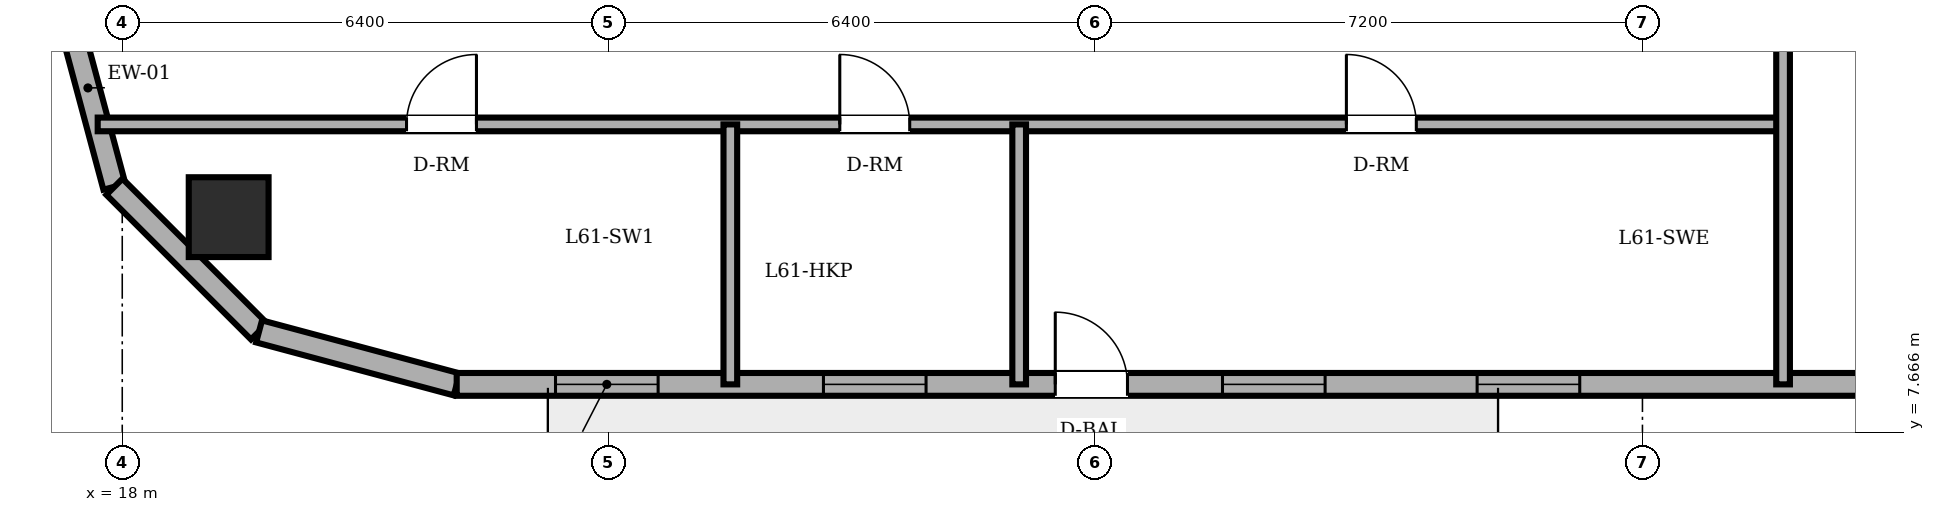
"""IFC4 building model, lengths in metres.
Left out: names, types, materials, properties, quantities, classifications, styles, units other than length and angle.
Written with IfcOpenShell. Run it as: python <this file> out.ifc"""

import sys

from ifc_helpers import new_model, si_unit, direction, frame, frame_2d, origin, origin_2d, place, context, subcontext, project, spatial, rectangle, circle, extrude, element, fill, save


model = new_model("IFC4")
c1 = context("Model", 3, precision=1e-05, world=origin(), true_north=direction((0.0, 1.0)))
c2 = subcontext(c1, "Body", "Model", "MODEL_VIEW")
j1 = project(units=[si_unit("LENGTHUNIT", "METRE"), si_unit("PLANEANGLEUNIT", "RADIAN")], contexts=[c1])
p1 = place(None, origin())
s1 = spatial("IfcSite", under=j1, at=p1, CompositionType="ELEMENT")
p2 = place(p1, origin())
s2 = spatial("IfcBuilding", under=s1, at=p2, CompositionType="ELEMENT")
p3 = place(p2, frame((0.0, 0.0, 233.7)))
s3 = spatial("IfcBuildingStorey", under=s2, at=p3, CompositionType="ELEMENT", Elevation=233.7)
p4 = place(p3, frame((19.4, 10.5, 0.0), z_axis=(0.0, 0.0, 1.0), x_axis=(1.0, 0.0, 0.0)))
e1 = element("IfcColumn", 1, at=p4, inside=s3, PredefinedType="COLUMN", context=c2, shape_type="SweptSolid", body=[
    extrude(circle(Radius=0.525, at=origin_2d()), origin(), (0.0, 0.0, 1.0), 3.6),
])
p5 = place(p3, frame((17.2, 13.5, 0.0), z_axis=(0.0, 0.0, 1.0), x_axis=(0.258932525951, -0.965895412042, 0.0)))
e2 = element("IfcWall", 2, at=p5, inside=s3, PredefinedType="SOLIDWALL", context=c2, shape_type="SweptSolid", body=[
    extrude(rectangle(XDim=2.692, YDim=0.3, at=frame_2d((1.346, 0.0))), origin(), (0.0, 0.0, 1.0), 3.4),
])
p6 = place(p3, frame((17.897, 10.9, 0.0), z_axis=(0.0, 0.0, 1.0), x_axis=(0.707152139074, -0.70706142039, 0.0)))
e3 = element("IfcWall", 3, at=p6, inside=s3, PredefinedType="SOLIDWALL", context=c2, shape_type="SweptSolid", body=[
    extrude(rectangle(XDim=2.691, YDim=0.3, at=frame_2d((1.346, 0.0))), origin(), (0.0, 0.0, 1.0), 3.4),
])
p7 = place(p3, frame((19.8, 8.997, 0.0), z_axis=(0.0, 0.0, 1.0), x_axis=(0.965889330541, -0.258955210695, 0.0)))
e4 = element("IfcWall", 4, at=p7, inside=s3, PredefinedType="SOLIDWALL", context=c2, shape_type="SweptSolid", body=[
    extrude(rectangle(XDim=2.692, YDim=0.3, at=frame_2d((1.346, 0.0))), origin(), (0.0, 0.0, 1.0), 3.4),
])
p8 = place(p3, frame((22.4, 8.3, 0.0), z_axis=(0.0, 0.0, 1.0), x_axis=(1.0, 0.0, 0.0)))
e5 = element("IfcWall", 5, at=p8, inside=s3, PredefinedType="SOLIDWALL", context=c2, shape_type="SweptSolid", body=[
    extrude(rectangle(XDim=32.485, YDim=0.3, at=frame_2d((16.243, 0.0))), origin(), (0.0, 0.0, 1.0), 3.4),
])
p9 = place(p8, frame((7.875, 0.0, 0.0)))
e6 = element("IfcOpeningElement", 6, at=p9, cuts=e5, PredefinedType="OPENING", context=c2, shape_type="SweptSolid", body=[
    extrude(rectangle(XDim=0.95, YDim=2.2, at=frame_2d((0.475, 1.1))), frame((0.0, 0.16, 0.0), z_axis=(0.0, -1.0, 0.0), x_axis=(1.0, 0.0, 0.0)), (0.0, 0.0, 1.0), 0.32),
])
p10 = place(p8, frame((1.3, 0.0, 0.85)))
e7 = element("IfcOpeningElement", 7, at=p10, cuts=e5, PredefinedType="OPENING", context=c2, shape_type="SweptSolid", body=[
    extrude(rectangle(XDim=1.35, YDim=1.55, at=frame_2d((0.675, 0.775))), frame((0.0, 0.16, 0.0), z_axis=(0.0, -1.0, 0.0), x_axis=(1.0, 0.0, 0.0)), (0.0, 0.0, 1.0), 0.32),
])
p11 = place(p8, frame((4.825, 0.0, 0.85)))
e8 = element("IfcOpeningElement", 8, at=p11, cuts=e5, PredefinedType="OPENING", context=c2, shape_type="SweptSolid", body=[
    extrude(rectangle(XDim=1.35, YDim=1.55, at=frame_2d((0.675, 0.775))), frame((0.0, 0.16, 0.0), z_axis=(0.0, -1.0, 0.0), x_axis=(1.0, 0.0, 0.0)), (0.0, 0.0, 1.0), 0.32),
])
p12 = place(p8, frame((10.075, 0.0, 0.85)))
e9 = element("IfcOpeningElement", 9, at=p12, cuts=e5, PredefinedType="OPENING", context=c2, shape_type="SweptSolid", body=[
    extrude(rectangle(XDim=1.35, YDim=1.55, at=frame_2d((0.675, 0.775))), frame((0.0, 0.16, 0.0), z_axis=(0.0, -1.0, 0.0), x_axis=(1.0, 0.0, 0.0)), (0.0, 0.0, 1.0), 0.32),
])
p13 = place(p8, frame((13.425, 0.0, 0.85)))
e10 = element("IfcOpeningElement", 10, at=p13, cuts=e5, PredefinedType="OPENING", context=c2, shape_type="SweptSolid", body=[
    extrude(rectangle(XDim=1.35, YDim=1.55, at=frame_2d((0.675, 0.775))), frame((0.0, 0.16, 0.0), z_axis=(0.0, -1.0, 0.0), x_axis=(1.0, 0.0, 0.0)), (0.0, 0.0, 1.0), 0.32),
])
p14 = place(p8, frame((21.67, 0.0, 0.85)))
e11 = element("IfcOpeningElement", 11, at=p14, cuts=e5, PredefinedType="OPENING", context=c2, shape_type="SweptSolid", body=[
    extrude(rectangle(XDim=1.35, YDim=1.55, at=frame_2d((0.675, 0.775))), frame((0.0, 0.16, 0.0), z_axis=(0.0, -1.0, 0.0), x_axis=(1.0, 0.0, 0.0)), (0.0, 0.0, 1.0), 0.32),
])
p15 = place(p8, frame((26.565, 0.0, 0.85)))
e12 = element("IfcOpeningElement", 12, at=p15, cuts=e5, PredefinedType="OPENING", context=c2, shape_type="SweptSolid", body=[
    extrude(rectangle(XDim=1.35, YDim=1.55, at=frame_2d((0.675, 0.775))), frame((0.0, 0.16, 0.0), z_axis=(0.0, -1.0, 0.0), x_axis=(1.0, 0.0, 0.0)), (0.0, 0.0, 1.0), 0.32),
])
p16 = place(p3, frame((17.677, 11.72, 0.0), z_axis=(0.0, 0.0, 1.0), x_axis=(1.0, 0.0, 0.0)))
e13 = element("IfcWall", 13, at=p16, inside=s3, PredefinedType="PARTITIONING", context=c2, shape_type="SweptSolid", body=[
    extrude(rectangle(XDim=22.173, YDim=0.18, at=frame_2d((11.086, 0.0))), origin(), (0.0, 0.0, 1.0), 3.4),
])
p17 = place(p16, frame((9.763, 0.0, 0.0)))
e14 = element("IfcOpeningElement", 14, at=p17, cuts=e13, PredefinedType="OPENING", context=c2, shape_type="SweptSolid", body=[
    extrude(rectangle(XDim=0.92, YDim=2.1, at=frame_2d((0.46, 1.05))), frame((0.0, 0.1, 0.0), z_axis=(0.0, -1.0, 0.0), x_axis=(1.0, 0.0, 0.0)), (0.0, 0.0, 1.0), 0.2),
])
p18 = place(p16, frame((4.063, 0.0, 0.0)))
e15 = element("IfcOpeningElement", 15, at=p18, cuts=e13, PredefinedType="OPENING", context=c2, shape_type="SweptSolid", body=[
    extrude(rectangle(XDim=0.92, YDim=2.1, at=frame_2d((0.46, 1.05))), frame((0.0, 0.1, 0.0), z_axis=(0.0, -1.0, 0.0), x_axis=(1.0, 0.0, 0.0)), (0.0, 0.0, 1.0), 0.2),
])
p19 = place(p16, frame((16.428, 0.0, 0.0)))
e16 = element("IfcOpeningElement", 16, at=p19, cuts=e13, PredefinedType="OPENING", context=c2, shape_type="SweptSolid", body=[
    extrude(rectangle(XDim=0.92, YDim=2.1, at=frame_2d((0.46, 1.05))), frame((0.0, 0.1, 0.0), z_axis=(0.0, -1.0, 0.0), x_axis=(1.0, 0.0, 0.0)), (0.0, 0.0, 1.0), 0.2),
])
for number, where, z_axis, x_axis in (
    (17, (26.0, 8.3, 0.0), (0.0, 0.0, 1.0), (0.0, 1.0, 0.0)),
    (18, (29.8, 8.3, 0.0), (0.0, 0.0, 1.0), (0.0, 1.0, 0.0)),
):
    element("IfcWall", number, at=place(p3, frame(where, z_axis=z_axis, x_axis=x_axis)), inside=s3, PredefinedType="PARTITIONING", context=c2, shape_type="SweptSolid", body=[
        extrude(rectangle(XDim=3.42, YDim=0.18, at=frame_2d((1.71, 0.0))), origin(), (0.0, 0.0, 1.0), 3.4),
    ])
p20 = place(p3, frame((39.85, 8.3, 0.0), z_axis=(0.0, 0.0, 1.0), x_axis=(0.0, 1.0, 0.0)))
e19 = element("IfcWall", 19, at=p20, inside=s3, PredefinedType="PARTITIONING", context=c2, shape_type="SweptSolid", body=[
    extrude(rectangle(XDim=14.52, YDim=0.18, at=frame_2d((7.26, 0.0))), origin(), (0.0, 0.0, 1.0), 3.4),
])
p21 = place(p9, origin())
e20 = element("IfcDoor", 20, at=p21, inside=s3, OperationType="SINGLE_SWING_LEFT", PredefinedType="DOOR", context=c2, shape_type="SweptSolid", body=[
    extrude(rectangle(XDim=0.95, YDim=2.2, at=frame_2d((0.475, 1.1))), frame((0.0, 0.025, 0.0), z_axis=(0.0, -1.0, 0.0), x_axis=(1.0, 0.0, 0.0)), (0.0, 0.0, 1.0), 0.05),
])
fill(e6, e20)
p22 = place(p10, origin())
e21 = element("IfcWindow", 21, at=p22, inside=s3, PartitioningType="SINGLE_PANEL", PredefinedType="WINDOW", context=c2, shape_type="SweptSolid", body=[
    extrude(rectangle(XDim=1.35, YDim=1.55, at=frame_2d((0.675, 0.775))), frame((0.0, 0.03, 0.0), z_axis=(0.0, -1.0, 0.0), x_axis=(1.0, 0.0, 0.0)), (0.0, 0.0, 1.0), 0.06),
])
fill(e7, e21)
p23 = place(p11, origin())
e22 = element("IfcWindow", 22, at=p23, inside=s3, PartitioningType="SINGLE_PANEL", PredefinedType="WINDOW", context=c2, shape_type="SweptSolid", body=[
    extrude(rectangle(XDim=1.35, YDim=1.55, at=frame_2d((0.675, 0.775))), frame((0.0, 0.03, 0.0), z_axis=(0.0, -1.0, 0.0), x_axis=(1.0, 0.0, 0.0)), (0.0, 0.0, 1.0), 0.06),
])
fill(e8, e22)
p24 = place(p12, origin())
e23 = element("IfcWindow", 23, at=p24, inside=s3, PartitioningType="SINGLE_PANEL", PredefinedType="WINDOW", context=c2, shape_type="SweptSolid", body=[
    extrude(rectangle(XDim=1.35, YDim=1.55, at=frame_2d((0.675, 0.775))), frame((0.0, 0.03, 0.0), z_axis=(0.0, -1.0, 0.0), x_axis=(1.0, 0.0, 0.0)), (0.0, 0.0, 1.0), 0.06),
])
fill(e9, e23)
p25 = place(p13, origin())
e24 = element("IfcWindow", 24, at=p25, inside=s3, PartitioningType="SINGLE_PANEL", PredefinedType="WINDOW", context=c2, shape_type="SweptSolid", body=[
    extrude(rectangle(XDim=1.35, YDim=1.55, at=frame_2d((0.675, 0.775))), frame((0.0, 0.03, 0.0), z_axis=(0.0, -1.0, 0.0), x_axis=(1.0, 0.0, 0.0)), (0.0, 0.0, 1.0), 0.06),
])
fill(e10, e24)
p26 = place(p17, origin())
e25 = element("IfcDoor", 25, at=p26, inside=s3, OperationType="SINGLE_SWING_LEFT", PredefinedType="DOOR", context=c2, shape_type="SweptSolid", body=[
    extrude(rectangle(XDim=0.92, YDim=2.1, at=frame_2d((0.46, 1.05))), frame((0.0, 0.025, 0.0), z_axis=(0.0, -1.0, 0.0), x_axis=(1.0, 0.0, 0.0)), (0.0, 0.0, 1.0), 0.05),
])
fill(e14, e25)
p27 = place(p18, origin())
e26 = element("IfcDoor", 26, at=p27, inside=s3, OperationType="SINGLE_SWING_RIGHT", PredefinedType="DOOR", context=c2, shape_type="SweptSolid", body=[
    extrude(rectangle(XDim=0.92, YDim=2.1, at=frame_2d((0.46, 1.05))), frame((0.0, 0.025, 0.0), z_axis=(0.0, -1.0, 0.0), x_axis=(1.0, 0.0, 0.0)), (0.0, 0.0, 1.0), 0.05),
])
fill(e15, e26)
p28 = place(p19, origin())
e27 = element("IfcDoor", 27, at=p28, inside=s3, OperationType="SINGLE_SWING_LEFT", PredefinedType="DOOR", context=c2, shape_type="SweptSolid", body=[
    extrude(rectangle(XDim=0.92, YDim=2.1, at=frame_2d((0.46, 1.05))), frame((0.0, 0.025, 0.0), z_axis=(0.0, -1.0, 0.0), x_axis=(1.0, 0.0, 0.0)), (0.0, 0.0, 1.0), 0.05),
])
fill(e16, e27)
save(model, sys.argv[1])
